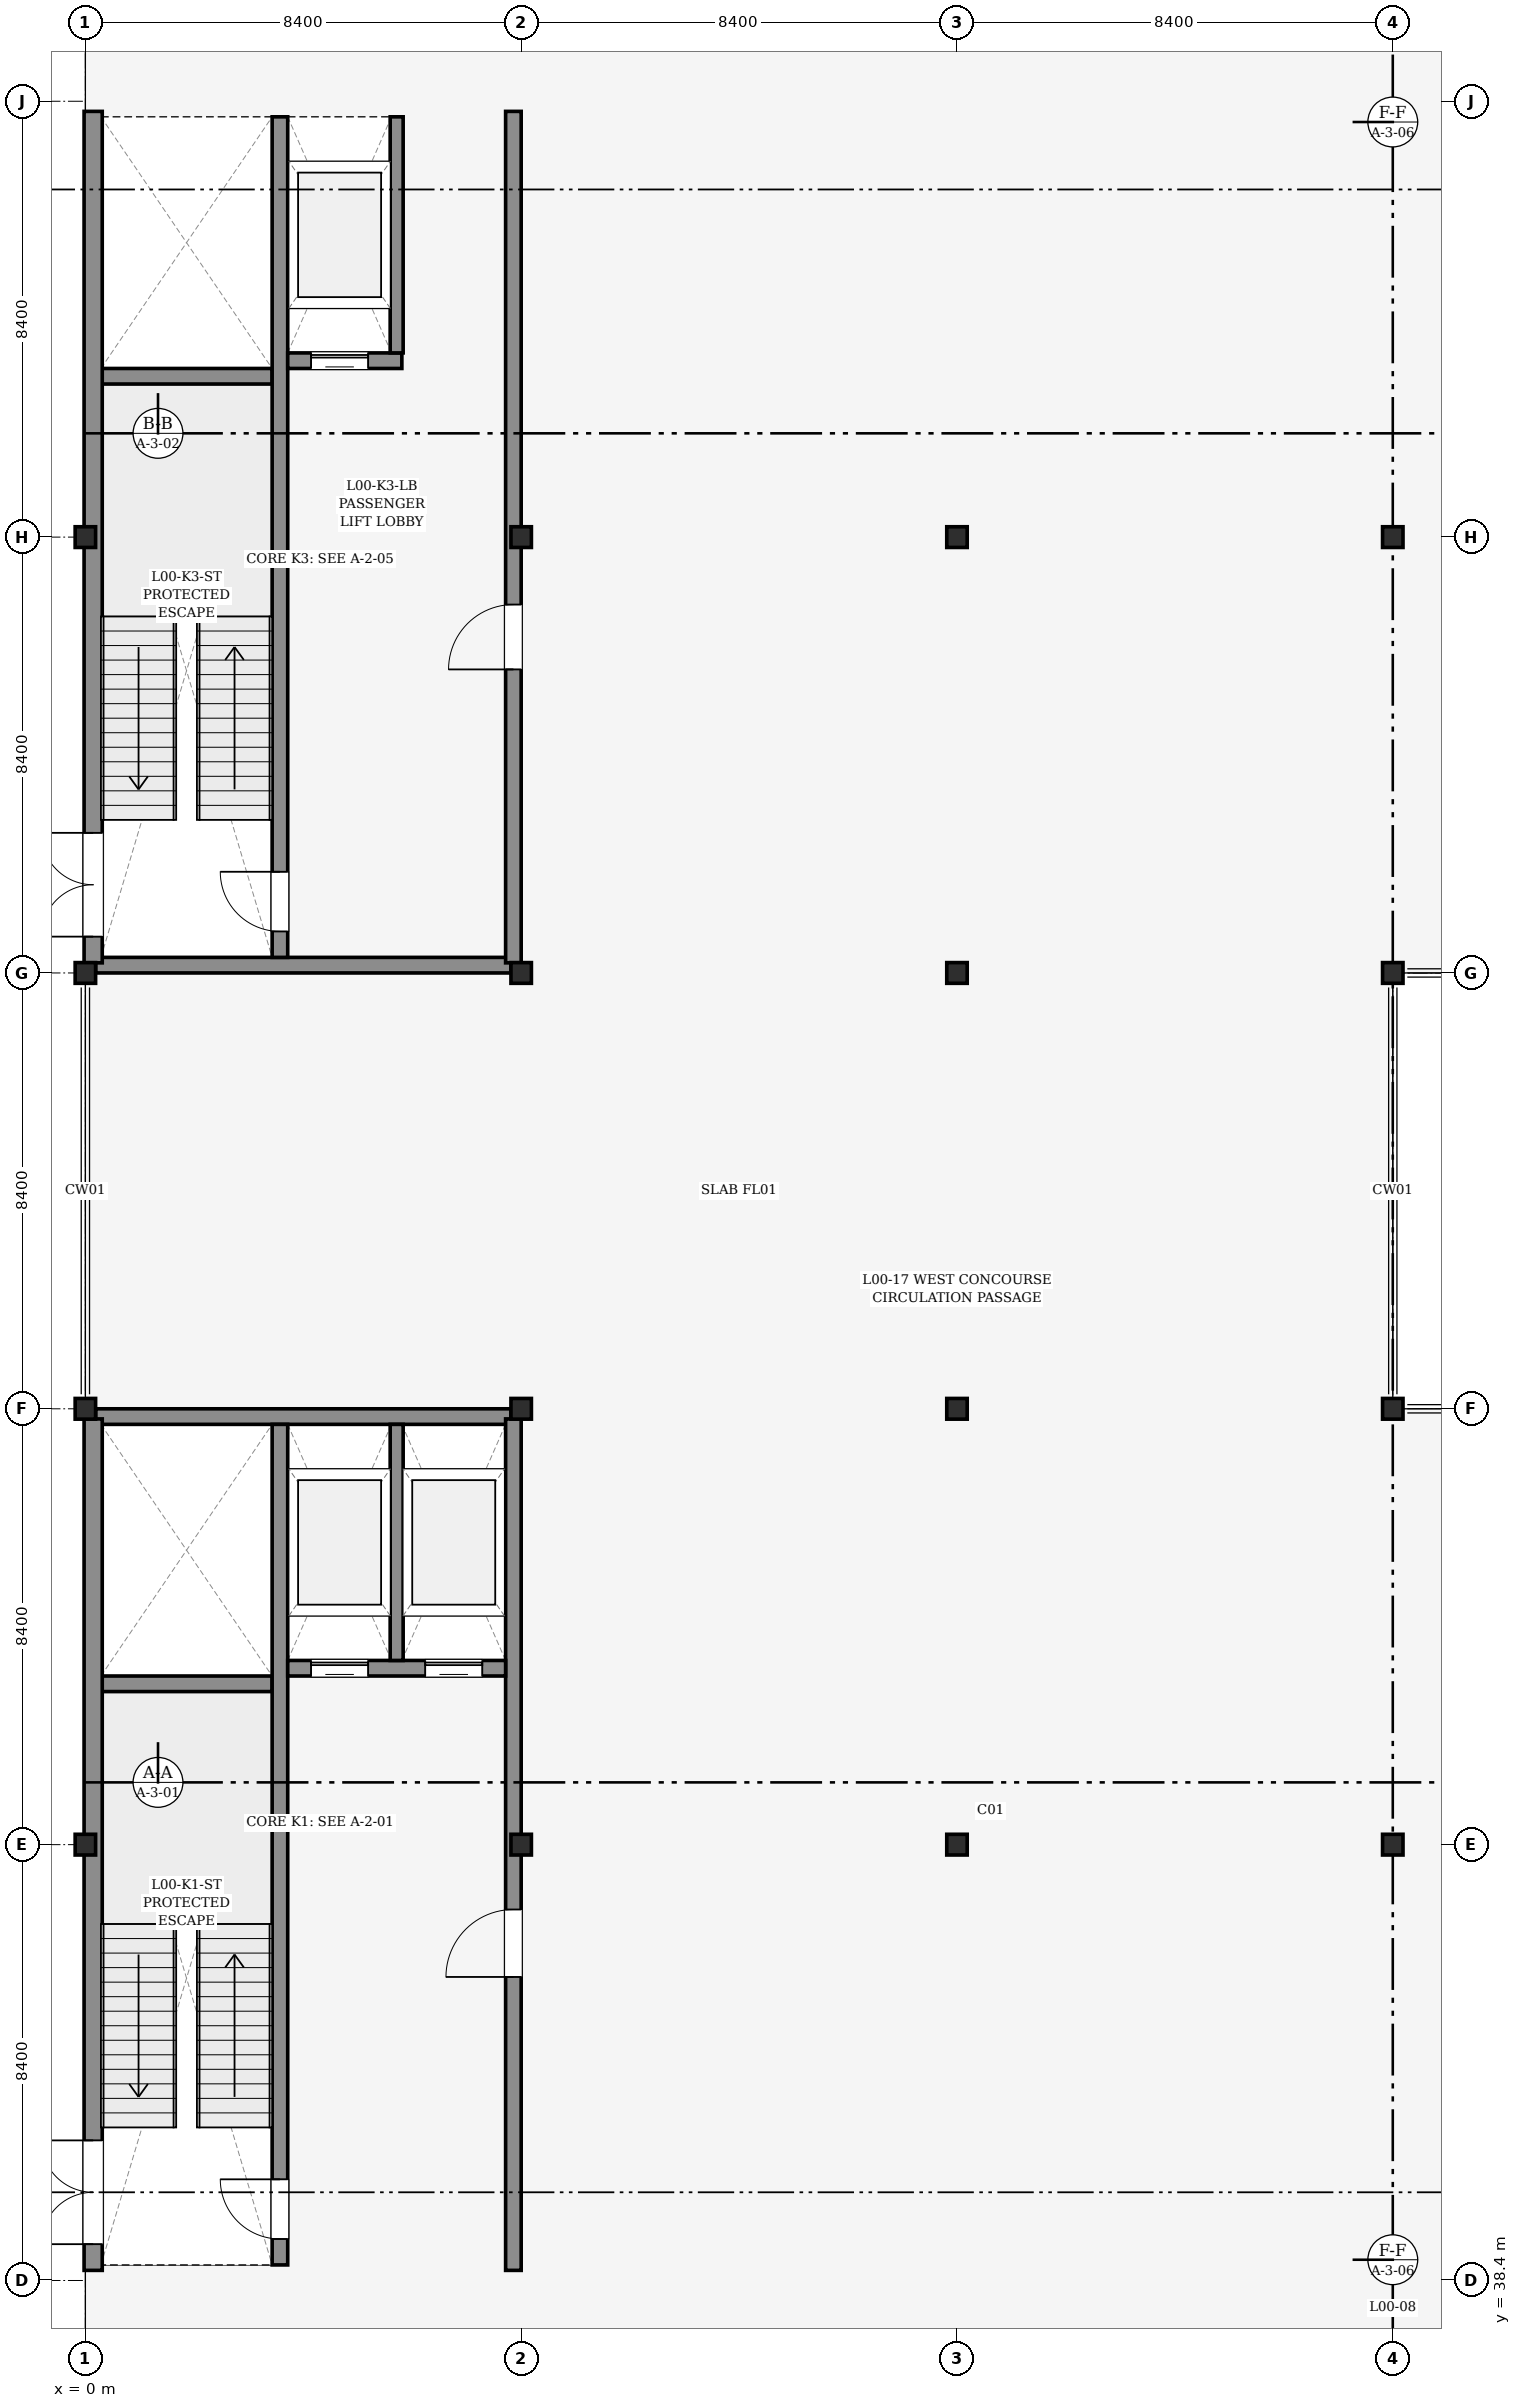
"""IFC4 building model, lengths in metres.
Left out: names, types, materials, properties, quantities, classifications, styles, units other than length and angle.
Written with IfcOpenShell. Run it as: python <this file> out.ifc"""

import sys

from ifc_helpers import new_model, si_unit, direction, frame, frame_2d, origin, origin_2d, place, context, subcontext, project, spatial, rectangle, i_section, extrude, element, fill, save


model = new_model("IFC4")
c1 = context("Model", 3, precision=1e-05, world=origin(), true_north=direction((0.0, 1.0)))
c2 = subcontext(c1, "Body", "Model", "MODEL_VIEW")
j1 = project(units=[si_unit("LENGTHUNIT", "METRE"), si_unit("PLANEANGLEUNIT", "RADIAN")], contexts=[c1])
p1 = place(None, origin())
s1 = spatial("IfcSite", under=j1, at=p1, CompositionType="ELEMENT")
p2 = place(p1, origin())
s2 = spatial("IfcBuilding", under=s1, at=p2, CompositionType="ELEMENT")
p3 = place(p2, origin())
s3 = spatial("IfcBuildingStorey", under=s2, at=p3, CompositionType="ELEMENT", Elevation=0.0)
for number, where, z_axis, x_axis in (
    (1, (0.0, 38.4, 0.0), (0.0, 0.0, 1.0), (1.0, 0.0, 0.0)),
    (2, (0.0, 46.8, 0.0), (0.0, 0.0, 1.0), (1.0, 0.0, 0.0)),
    (3, (0.0, 55.2, 0.0), (0.0, 0.0, 1.0), (1.0, 0.0, 0.0)),
    (4, (0.0, 63.6, 0.0), (0.0, 0.0, 1.0), (1.0, 0.0, 0.0)),
    (5, (0.0, 72.0, 0.0), (0.0, 0.0, 1.0), (1.0, 0.0, 0.0)),
    (6, (0.0, 80.4, 0.0), (0.0, 0.0, 1.0), (1.0, 0.0, 0.0)),
    (7, (8.4, 38.4, 0.0), (0.0, 0.0, 1.0), (1.0, 0.0, 0.0)),
    (8, (8.4, 46.8, 0.0), (0.0, 0.0, 1.0), (1.0, 0.0, 0.0)),
    (9, (8.4, 55.2, 0.0), (0.0, 0.0, 1.0), (1.0, 0.0, 0.0)),
    (10, (8.4, 63.6, 0.0), (0.0, 0.0, 1.0), (1.0, 0.0, 0.0)),
    (11, (8.4, 72.0, 0.0), (0.0, 0.0, 1.0), (1.0, 0.0, 0.0)),
    (12, (8.4, 80.4, 0.0), (0.0, 0.0, 1.0), (1.0, 0.0, 0.0)),
    (13, (16.8, 38.4, 0.0), (0.0, 0.0, 1.0), (1.0, 0.0, 0.0)),
    (14, (16.8, 46.8, 0.0), (0.0, 0.0, 1.0), (1.0, 0.0, 0.0)),
    (15, (16.8, 55.2, 0.0), (0.0, 0.0, 1.0), (1.0, 0.0, 0.0)),
    (16, (16.8, 63.6, 0.0), (0.0, 0.0, 1.0), (1.0, 0.0, 0.0)),
    (17, (16.8, 72.0, 0.0), (0.0, 0.0, 1.0), (1.0, 0.0, 0.0)),
    (18, (16.8, 80.4, 0.0), (0.0, 0.0, 1.0), (1.0, 0.0, 0.0)),
    (19, (25.2, 38.4, 0.0), (0.0, 0.0, 1.0), (1.0, 0.0, 0.0)),
    (20, (25.2, 46.8, 0.0), (0.0, 0.0, 1.0), (1.0, 0.0, 0.0)),
    (21, (25.2, 55.2, 0.0), (0.0, 0.0, 1.0), (1.0, 0.0, 0.0)),
    (22, (25.2, 63.6, 0.0), (0.0, 0.0, 1.0), (1.0, 0.0, 0.0)),
    (23, (25.2, 72.0, 0.0), (0.0, 0.0, 1.0), (1.0, 0.0, 0.0)),
    (24, (25.2, 80.4, 0.0), (0.0, 0.0, 1.0), (1.0, 0.0, 0.0)),
):
    element("IfcColumn", number, at=place(p3, frame(where, z_axis=z_axis, x_axis=x_axis)), inside=s3, PredefinedType="COLUMN", context=c2, shape_type="SweptSolid", body=[
        extrude(i_section(OverallWidth=0.399, OverallDepth=0.394, WebThickness=0.023, FlangeThickness=0.037, FilletRadius=0.015, at=origin_2d()), origin(), (0.0, 0.0, 1.0), 5.4),
    ])
for number, where, z_axis, x_axis in (
    (25, (0.198, 38.55, 0.0), (0.0, 0.0, 1.0), (1.0, 0.0, 0.0)),
    (26, (0.198, 55.05, 0.0), (0.0, 0.0, 1.0), (1.0, 0.0, 0.0)),
):
    element("IfcWall", number, at=place(p3, frame(where, z_axis=z_axis, x_axis=x_axis)), inside=s3, PredefinedType="SHEAR", context=c2, shape_type="SweptSolid", body=[
        extrude(rectangle(XDim=8.005, YDim=0.3, at=frame_2d((4.002, 0.0))), origin(), (0.0, 0.0, 1.0), 5.18),
    ])
p4 = place(p3, frame((0.3, 49.9, 0.0), z_axis=(0.0, 0.0, 1.0), x_axis=(1.0, 0.0, 0.0)))
e27 = element("IfcWall", 27, at=p4, inside=s3, PredefinedType="SHEAR", context=c2, shape_type="SweptSolid", body=[
    extrude(rectangle(XDim=3.3, YDim=0.3, at=frame_2d((1.65, 0.0))), origin(), (0.0, 0.0, 1.0), 5.18),
])
p5 = place(p3, frame((0.15, 38.595, 0.0), z_axis=(0.0, 0.0, 1.0), x_axis=(0.0, 1.0, 0.0)))
e28 = element("IfcWall", 28, at=p5, inside=s3, PredefinedType="SHEAR", context=c2, shape_type="SweptSolid", body=[
    extrude(rectangle(XDim=16.41, YDim=0.35, at=frame_2d((8.205, 0.0))), origin(), (0.0, 0.0, 1.0), 5.18),
])
p6 = place(p5, frame((0.505, 0.0, 0.0)))
e29 = element("IfcOpeningElement", 29, at=p6, cuts=e28, PredefinedType="OPENING", context=c2, shape_type="SweptSolid", body=[
    extrude(rectangle(XDim=2.0, YDim=2.2, at=frame_2d((1.0, 1.1))), frame((0.0, 0.185, 0.0), z_axis=(0.0, -1.0, 0.0), x_axis=(1.0, 0.0, 0.0)), (0.0, 0.0, 1.0), 0.37),
])
p7 = place(p3, frame((8.25, 38.595, 0.0), z_axis=(0.0, 0.0, 1.0), x_axis=(0.0, 1.0, 0.0)))
e30 = element("IfcWall", 30, at=p7, inside=s3, PredefinedType="SHEAR", context=c2, shape_type="SweptSolid", body=[
    extrude(rectangle(XDim=16.41, YDim=0.3, at=frame_2d((8.205, 0.0))), origin(), (0.0, 0.0, 1.0), 5.18),
])
p8 = place(p7, frame((5.655, 0.0, 0.0)))
e31 = element("IfcOpeningElement", 31, at=p8, cuts=e30, PredefinedType="OPENING", context=c2, shape_type="SweptSolid", body=[
    extrude(rectangle(XDim=1.3, YDim=2.2, at=frame_2d((0.65, 1.1))), frame((0.0, 0.16, 0.0), z_axis=(0.0, -1.0, 0.0), x_axis=(1.0, 0.0, 0.0)), (0.0, 0.0, 1.0), 0.32),
])
p9 = place(p3, frame((3.75, 38.7, 0.0), z_axis=(0.0, 0.0, 1.0), x_axis=(0.0, 1.0, 0.0)))
e32 = element("IfcWall", 32, at=p9, inside=s3, PredefinedType="SHEAR", context=c2, shape_type="SweptSolid", body=[
    extrude(rectangle(XDim=16.2, YDim=0.3, at=frame_2d((8.1, 0.0))), origin(), (0.0, 0.0, 1.0), 5.18),
])
p10 = place(p9, frame((0.5, 0.0, 0.0)))
e33 = element("IfcOpeningElement", 33, at=p10, cuts=e32, PredefinedType="OPENING", context=c2, shape_type="SweptSolid", body=[
    extrude(rectangle(XDim=1.15, YDim=2.15, at=frame_2d((0.575, 1.075))), frame((0.0, 0.16, 0.0), z_axis=(0.0, -1.0, 0.0), x_axis=(1.0, 0.0, 0.0)), (0.0, 0.0, 1.0), 0.32),
])
p11 = place(p3, frame((3.9, 50.2, 0.0), z_axis=(0.0, 0.0, 1.0), x_axis=(1.0, 0.0, 0.0)))
e34 = element("IfcWall", 34, at=p11, inside=s3, PredefinedType="SHEAR", context=c2, shape_type="SweptSolid", body=[
    extrude(rectangle(XDim=4.2, YDim=0.3, at=frame_2d((2.1, 0.0))), origin(), (0.0, 0.0, 1.0), 5.18),
])
p12 = place(p11, frame((0.45, 0.0, 0.0)))
e35 = element("IfcOpeningElement", 35, at=p12, cuts=e34, PredefinedType="OPENING", context=c2, shape_type="SweptSolid", body=[
    extrude(rectangle(XDim=1.1, YDim=2.2, at=frame_2d((0.55, 1.1))), frame((0.0, 0.16, 0.0), z_axis=(0.0, -1.0, 0.0), x_axis=(1.0, 0.0, 0.0)), (0.0, 0.0, 1.0), 0.32),
])
p13 = place(p11, frame((2.65, 0.0, 0.0)))
e36 = element("IfcOpeningElement", 36, at=p13, cuts=e34, PredefinedType="OPENING", context=c2, shape_type="SweptSolid", body=[
    extrude(rectangle(XDim=1.1, YDim=2.2, at=frame_2d((0.55, 1.1))), frame((0.0, 0.16, 0.0), z_axis=(0.0, -1.0, 0.0), x_axis=(1.0, 0.0, 0.0)), (0.0, 0.0, 1.0), 0.32),
])
p14 = place(p3, frame((6.0, 50.35, 0.0), z_axis=(0.0, 0.0, 1.0), x_axis=(0.0, 1.0, 0.0)))
e37 = element("IfcWall", 37, at=p14, inside=s3, PredefinedType="PARTITIONING", context=c2, shape_type="SweptSolid", body=[
    extrude(rectangle(XDim=4.55, YDim=0.25, at=frame_2d((2.275, 0.0))), origin(), (0.0, 0.0, 1.0), 4.325),
])
for number, where, z_axis, x_axis in (
    (38, (0.198, 63.75, 0.0), (0.0, 0.0, 1.0), (1.0, 0.0, 0.0)),
    (39, (0.198, 80.25, 0.0), (0.0, 0.0, 1.0), (1.0, 0.0, 0.0)),
):
    element("IfcWall", number, at=place(p3, frame(where, z_axis=z_axis, x_axis=x_axis)), inside=s3, PredefinedType="SHEAR", context=c2, shape_type="SweptSolid", body=[
        extrude(rectangle(XDim=8.005, YDim=0.3, at=frame_2d((4.002, 0.0))), origin(), (0.0, 0.0, 1.0), 5.18),
    ])
p15 = place(p3, frame((0.3, 75.1, 0.0), z_axis=(0.0, 0.0, 1.0), x_axis=(1.0, 0.0, 0.0)))
e40 = element("IfcWall", 40, at=p15, inside=s3, PredefinedType="SHEAR", context=c2, shape_type="SweptSolid", body=[
    extrude(rectangle(XDim=3.3, YDim=0.3, at=frame_2d((1.65, 0.0))), origin(), (0.0, 0.0, 1.0), 5.18),
])
p16 = place(p3, frame((0.15, 63.795, 0.0), z_axis=(0.0, 0.0, 1.0), x_axis=(0.0, 1.0, 0.0)))
e41 = element("IfcWall", 41, at=p16, inside=s3, PredefinedType="SHEAR", context=c2, shape_type="SweptSolid", body=[
    extrude(rectangle(XDim=16.41, YDim=0.35, at=frame_2d((8.205, 0.0))), origin(), (0.0, 0.0, 1.0), 5.18),
])
p17 = place(p16, frame((0.505, 0.0, 0.0)))
e42 = element("IfcOpeningElement", 42, at=p17, cuts=e41, PredefinedType="OPENING", context=c2, shape_type="SweptSolid", body=[
    extrude(rectangle(XDim=2.0, YDim=2.28, at=frame_2d((1.0, 1.14))), frame((0.0, 0.185, 0.0), z_axis=(0.0, -1.0, 0.0), x_axis=(1.0, 0.0, 0.0)), (0.0, 0.0, 1.0), 0.37),
])
p18 = place(p3, frame((8.25, 63.795, 0.0), z_axis=(0.0, 0.0, 1.0), x_axis=(0.0, 1.0, 0.0)))
e43 = element("IfcWall", 43, at=p18, inside=s3, PredefinedType="SHEAR", context=c2, shape_type="SweptSolid", body=[
    extrude(rectangle(XDim=16.41, YDim=0.3, at=frame_2d((8.205, 0.0))), origin(), (0.0, 0.0, 1.0), 5.18),
])
p19 = place(p18, frame((5.655, 0.0, 0.0)))
e44 = element("IfcOpeningElement", 44, at=p19, cuts=e43, PredefinedType="OPENING", context=c2, shape_type="SweptSolid", body=[
    extrude(rectangle(XDim=1.25, YDim=2.15, at=frame_2d((0.625, 1.075))), frame((0.0, 0.16, 0.0), z_axis=(0.0, -1.0, 0.0), x_axis=(1.0, 0.0, 0.0)), (0.0, 0.0, 1.0), 0.32),
])
p20 = place(p3, frame((3.75, 63.9, 0.0), z_axis=(0.0, 0.0, 1.0), x_axis=(0.0, 1.0, 0.0)))
e45 = element("IfcWall", 45, at=p20, inside=s3, PredefinedType="SHEAR", context=c2, shape_type="SweptSolid", body=[
    extrude(rectangle(XDim=16.2, YDim=0.3, at=frame_2d((8.1, 0.0))), origin(), (0.0, 0.0, 1.0), 5.18),
])
p21 = place(p20, frame((0.5, 0.0, 0.0)))
e46 = element("IfcOpeningElement", 46, at=p21, cuts=e45, PredefinedType="OPENING", context=c2, shape_type="SweptSolid", body=[
    extrude(rectangle(XDim=1.15, YDim=2.15, at=frame_2d((0.575, 1.075))), frame((0.0, 0.16, 0.0), z_axis=(0.0, -1.0, 0.0), x_axis=(1.0, 0.0, 0.0)), (0.0, 0.0, 1.0), 0.32),
])
p22 = place(p3, frame((3.9, 75.4, 0.0), z_axis=(0.0, 0.0, 1.0), x_axis=(1.0, 0.0, 0.0)))
e47 = element("IfcWall", 47, at=p22, inside=s3, PredefinedType="SHEAR", context=c2, shape_type="SweptSolid", body=[
    extrude(rectangle(XDim=2.2, YDim=0.3, at=frame_2d((1.1, 0.0))), origin(), (0.0, 0.0, 1.0), 5.18),
])
p23 = place(p22, frame((0.45, 0.0, 0.0)))
e48 = element("IfcOpeningElement", 48, at=p23, cuts=e47, PredefinedType="OPENING", context=c2, shape_type="SweptSolid", body=[
    extrude(rectangle(XDim=1.1, YDim=2.2, at=frame_2d((0.55, 1.1))), frame((0.0, 0.16, 0.0), z_axis=(0.0, -1.0, 0.0), x_axis=(1.0, 0.0, 0.0)), (0.0, 0.0, 1.0), 0.32),
])
p24 = place(p3, frame((6.0, 75.55, 0.0), z_axis=(0.0, 0.0, 1.0), x_axis=(0.0, 1.0, 0.0)))
e49 = element("IfcWall", 49, at=p24, inside=s3, PredefinedType="PARTITIONING", context=c2, shape_type="SweptSolid", body=[
    extrude(rectangle(XDim=4.55, YDim=0.25, at=frame_2d((2.275, 0.0))), origin(), (0.0, 0.0, 1.0), 4.325),
])
p25 = place(p3, frame((25.6, 38.4, 0.0), z_axis=(0.0, 0.0, 1.0), x_axis=(1.0, 0.0, 0.0)))
e50 = element("IfcWall", 50, at=p25, inside=s3, PredefinedType="PARTITIONING", context=c2, shape_type="SweptSolid", body=[
    extrude(rectangle(XDim=32.8, YDim=0.2, at=frame_2d((16.4, 0.0))), origin(), (0.0, 0.0, 1.0), 4.325),
])
p26 = place(p25, frame((4.0, 0.0, 0.0)))
e51 = element("IfcOpeningElement", 51, at=p26, cuts=e50, PredefinedType="OPENING", context=c2, shape_type="SweptSolid", body=[
    extrude(rectangle(XDim=1.6, YDim=2.25, at=frame_2d((0.8, 1.125))), frame((0.0, 0.11, 0.0), z_axis=(0.0, -1.0, 0.0), x_axis=(1.0, 0.0, 0.0)), (0.0, 0.0, 1.0), 0.22),
])
p27 = place(p6, origin())
e52 = element("IfcDoor", 52, at=p27, inside=s3, OperationType="DOUBLE_DOOR_SINGLE_SWING", PredefinedType="DOOR", context=c2, shape_type="SweptSolid", body=[
    extrude(rectangle(XDim=2.0, YDim=2.2, at=frame_2d((1.0, 1.1))), frame((0.0, 0.025, 0.0), z_axis=(0.0, -1.0, 0.0), x_axis=(1.0, 0.0, 0.0)), (0.0, 0.0, 1.0), 0.05),
])
fill(e29, e52)
p28 = place(p8, origin())
e53 = element("IfcDoor", 53, at=p28, inside=s3, OperationType="SINGLE_SWING_LEFT", PredefinedType="DOOR", context=c2, shape_type="SweptSolid", body=[
    extrude(rectangle(XDim=1.3, YDim=2.2, at=frame_2d((0.65, 1.1))), frame((0.0, 0.025, 0.0), z_axis=(0.0, -1.0, 0.0), x_axis=(1.0, 0.0, 0.0)), (0.0, 0.0, 1.0), 0.05),
])
fill(e31, e53)
p29 = place(p10, frame((1.15, 0.0, 0.0), z_axis=(0.0, 0.0, 1.0), x_axis=(-1.0, 0.0, 0.0)))
e54 = element("IfcDoor", 54, at=p29, inside=s3, OperationType="SINGLE_SWING_LEFT", PredefinedType="DOOR", context=c2, shape_type="SweptSolid", body=[
    extrude(rectangle(XDim=1.15, YDim=2.15, at=frame_2d((0.575, 1.075))), frame((0.0, 0.025, 0.0), z_axis=(0.0, -1.0, 0.0), x_axis=(1.0, 0.0, 0.0)), (0.0, 0.0, 1.0), 0.05),
])
fill(e33, e54)
p30 = place(p12, origin())
e55 = element("IfcDoor", 55, at=p30, inside=s3, OperationType="SLIDING_TO_LEFT", PredefinedType="DOOR", context=c2, shape_type="SweptSolid", body=[
    extrude(rectangle(XDim=1.1, YDim=2.2, at=frame_2d((0.55, 1.1))), frame((0.0, 0.025, 0.0), z_axis=(0.0, -1.0, 0.0), x_axis=(1.0, 0.0, 0.0)), (0.0, 0.0, 1.0), 0.05),
])
fill(e35, e55)
p31 = place(p13, origin())
e56 = element("IfcDoor", 56, at=p31, inside=s3, OperationType="SLIDING_TO_LEFT", PredefinedType="DOOR", context=c2, shape_type="SweptSolid", body=[
    extrude(rectangle(XDim=1.1, YDim=2.2, at=frame_2d((0.55, 1.1))), frame((0.0, 0.025, 0.0), z_axis=(0.0, -1.0, 0.0), x_axis=(1.0, 0.0, 0.0)), (0.0, 0.0, 1.0), 0.05),
])
fill(e36, e56)
p32 = place(p17, origin())
e57 = element("IfcDoor", 57, at=p32, inside=s3, OperationType="DOUBLE_DOOR_SINGLE_SWING", PredefinedType="DOOR", context=c2, shape_type="SweptSolid", body=[
    extrude(rectangle(XDim=2.0, YDim=2.28, at=frame_2d((1.0, 1.14))), frame((0.0, 0.025, 0.0), z_axis=(0.0, -1.0, 0.0), x_axis=(1.0, 0.0, 0.0)), (0.0, 0.0, 1.0), 0.05),
])
fill(e42, e57)
p33 = place(p19, origin())
e58 = element("IfcDoor", 58, at=p33, inside=s3, OperationType="SINGLE_SWING_LEFT", PredefinedType="DOOR", context=c2, shape_type="SweptSolid", body=[
    extrude(rectangle(XDim=1.25, YDim=2.15, at=frame_2d((0.625, 1.075))), frame((0.0, 0.025, 0.0), z_axis=(0.0, -1.0, 0.0), x_axis=(1.0, 0.0, 0.0)), (0.0, 0.0, 1.0), 0.05),
])
fill(e44, e58)
p34 = place(p21, frame((1.15, 0.0, 0.0), z_axis=(0.0, 0.0, 1.0), x_axis=(-1.0, 0.0, 0.0)))
e59 = element("IfcDoor", 59, at=p34, inside=s3, OperationType="SINGLE_SWING_LEFT", PredefinedType="DOOR", context=c2, shape_type="SweptSolid", body=[
    extrude(rectangle(XDim=1.15, YDim=2.15, at=frame_2d((0.575, 1.075))), frame((0.0, 0.025, 0.0), z_axis=(0.0, -1.0, 0.0), x_axis=(1.0, 0.0, 0.0)), (0.0, 0.0, 1.0), 0.05),
])
fill(e46, e59)
p35 = place(p23, origin())
e60 = element("IfcDoor", 60, at=p35, inside=s3, OperationType="SLIDING_TO_LEFT", PredefinedType="DOOR", context=c2, shape_type="SweptSolid", body=[
    extrude(rectangle(XDim=1.1, YDim=2.2, at=frame_2d((0.55, 1.1))), frame((0.0, 0.025, 0.0), z_axis=(0.0, -1.0, 0.0), x_axis=(1.0, 0.0, 0.0)), (0.0, 0.0, 1.0), 0.05),
])
fill(e48, e60)
save(model, sys.argv[1])
